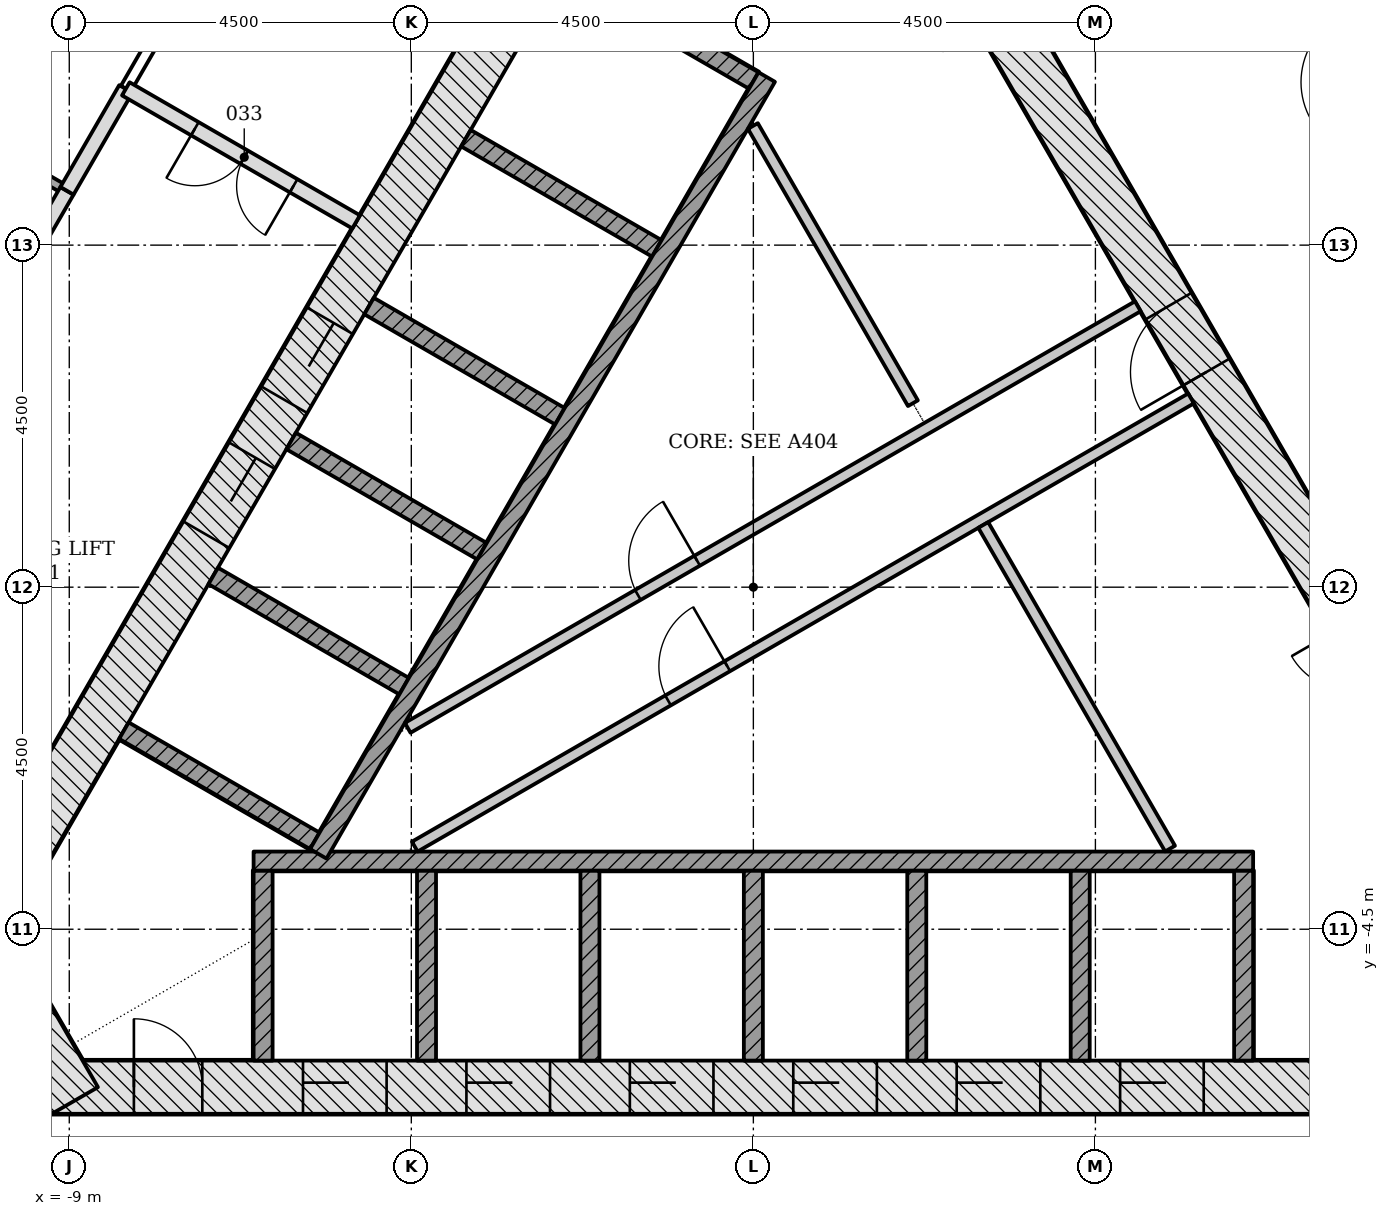
"""IFC4 building model, lengths in metres.
Left out: names, types, materials, properties, quantities, classifications, styles, units other than length and angle.
Written with IfcOpenShell. Run it as: python <this file> out.ifc"""

import sys

from ifc_helpers import new_model, si_unit, direction, frame, frame_2d, origin, place, context, subcontext, project, spatial, rectangle, extrude, element, fill, save


model = new_model("IFC4")
c1 = context("Model", 3, precision=1e-05, world=origin(), true_north=direction((0.0, 1.0)))
c2 = subcontext(c1, "Body", "Model", "MODEL_VIEW")
j1 = project(units=[si_unit("LENGTHUNIT", "METRE"), si_unit("PLANEANGLEUNIT", "RADIAN")], contexts=[c1])
p1 = place(None, origin())
s1 = spatial("IfcSite", under=j1, at=p1, CompositionType="ELEMENT")
p2 = place(p1, origin())
s2 = spatial("IfcBuilding", under=s1, at=p2, CompositionType="ELEMENT")
p3 = place(p2, frame((0.0, 0.0, 6.0)))
s3 = spatial("IfcBuildingStorey", under=s2, at=p3, CompositionType="ELEMENT", Elevation=6.0)
p4 = place(p3, frame((-9.229, -6.578, -0.25), z_axis=(0.0, 0.0, 1.0), x_axis=(1.0, 0.0, 0.0)))
e1 = element("IfcWall", 1, at=p4, inside=s3, PredefinedType="SHEAR", context=c2, shape_type="SweptSolid", body=[
    extrude(rectangle(XDim=18.458, YDim=0.7, at=frame_2d((9.229, 0.0))), origin(), (0.0, 0.0, 1.0), 4.5),
])
p5 = place(p4, frame((3.304, 0.0, 0.25)))
e2 = element("IfcOpeningElement", 2, at=p5, cuts=e1, PredefinedType="OPENING", context=c2, shape_type="SweptSolid", body=[
    extrude(rectangle(XDim=1.1, YDim=2.1, at=frame_2d((0.55, 1.05))), frame((0.0, 0.36, 0.0), z_axis=(0.0, -1.0, 0.0), x_axis=(1.0, 0.0, 0.0)), (0.0, 0.0, 1.0), 0.72),
])
p6 = place(p4, frame((5.454, 0.0, 0.25)))
e3 = element("IfcOpeningElement", 3, at=p6, cuts=e1, PredefinedType="OPENING", context=c2, shape_type="SweptSolid", body=[
    extrude(rectangle(XDim=1.1, YDim=2.1, at=frame_2d((0.55, 1.05))), frame((0.0, 0.36, 0.0), z_axis=(0.0, -1.0, 0.0), x_axis=(1.0, 0.0, 0.0)), (0.0, 0.0, 1.0), 0.72),
])
p7 = place(p4, frame((7.604, 0.0, 0.25)))
e4 = element("IfcOpeningElement", 4, at=p7, cuts=e1, PredefinedType="OPENING", context=c2, shape_type="SweptSolid", body=[
    extrude(rectangle(XDim=1.1, YDim=2.1, at=frame_2d((0.55, 1.05))), frame((0.0, 0.36, 0.0), z_axis=(0.0, -1.0, 0.0), x_axis=(1.0, 0.0, 0.0)), (0.0, 0.0, 1.0), 0.72),
])
p8 = place(p4, frame((9.754, 0.0, 0.25)))
e5 = element("IfcOpeningElement", 5, at=p8, cuts=e1, PredefinedType="OPENING", context=c2, shape_type="SweptSolid", body=[
    extrude(rectangle(XDim=1.1, YDim=2.1, at=frame_2d((0.55, 1.05))), frame((0.0, 0.36, 0.0), z_axis=(0.0, -1.0, 0.0), x_axis=(1.0, 0.0, 0.0)), (0.0, 0.0, 1.0), 0.72),
])
p9 = place(p4, frame((11.904, 0.0, 0.25)))
e6 = element("IfcOpeningElement", 6, at=p9, cuts=e1, PredefinedType="OPENING", context=c2, shape_type="SweptSolid", body=[
    extrude(rectangle(XDim=1.1, YDim=2.1, at=frame_2d((0.55, 1.05))), frame((0.0, 0.36, 0.0), z_axis=(0.0, -1.0, 0.0), x_axis=(1.0, 0.0, 0.0)), (0.0, 0.0, 1.0), 0.72),
])
p10 = place(p4, frame((14.054, 0.0, 0.25)))
e7 = element("IfcOpeningElement", 7, at=p10, cuts=e1, PredefinedType="OPENING", context=c2, shape_type="SweptSolid", body=[
    extrude(rectangle(XDim=1.1, YDim=2.1, at=frame_2d((0.55, 1.05))), frame((0.0, 0.36, 0.0), z_axis=(0.0, -1.0, 0.0), x_axis=(1.0, 0.0, 0.0)), (0.0, 0.0, 1.0), 0.72),
])
p11 = place(p4, frame((1.079, 0.0, 0.25)))
e8 = element("IfcOpeningElement", 8, at=p11, cuts=e1, PredefinedType="OPENING", context=c2, shape_type="SweptSolid", body=[
    extrude(rectangle(XDim=0.9, YDim=2.1, at=frame_2d((0.45, 1.05))), frame((0.0, 0.36, 0.0), z_axis=(0.0, -1.0, 0.0), x_axis=(1.0, 0.0, 0.0)), (0.0, 0.0, 1.0), 0.72),
])
p12 = place(p3, frame((10.311, -4.703, -0.25), z_axis=(0.0, 0.0, 1.0), x_axis=(-0.500001446645, 0.866024568562, 0.0)))
e9 = element("IfcWall", 9, at=p12, inside=s3, PredefinedType="SHEAR", context=c2, shape_type="SweptSolid", body=[
    extrude(rectangle(XDim=18.458, YDim=0.7, at=frame_2d((9.229, 0.0))), origin(), (0.0, 0.0, 1.0), 4.5),
])
p13 = place(p12, frame((8.7, 0.0, 0.25)))
e10 = element("IfcOpeningElement", 10, at=p13, cuts=e9, PredefinedType="OPENING", context=c2, shape_type="SweptSolid", body=[
    extrude(rectangle(XDim=1.0, YDim=2.1, at=frame_2d((0.5, 1.05))), frame((0.0, 0.36, 0.0), z_axis=(0.0, -1.0, 0.0), x_axis=(1.0, 0.0, 0.0)), (0.0, 0.0, 1.0), 0.72),
])
p14 = place(p12, frame((4.002, 0.0, 0.25)))
e11 = element("IfcOpeningElement", 11, at=p14, cuts=e9, PredefinedType="OPENING", context=c2, shape_type="SweptSolid", body=[
    extrude(rectangle(XDim=0.9, YDim=2.1, at=frame_2d((0.45, 1.05))), frame((0.0, 0.36, 0.0), z_axis=(0.0, -1.0, 0.0), x_axis=(1.0, 0.0, 0.0)), (0.0, 0.0, 1.0), 0.72),
])
p15 = place(p12, frame((14.093, 0.0, 0.25)))
e12 = element("IfcOpeningElement", 12, at=p15, cuts=e9, PredefinedType="OPENING", context=c2, shape_type="SweptSolid", body=[
    extrude(rectangle(XDim=0.9, YDim=2.1, at=frame_2d((0.45, 1.05))), frame((0.0, 0.36, 0.0), z_axis=(0.0, -1.0, 0.0), x_axis=(1.0, 0.0, 0.0)), (0.0, 0.0, 1.0), 0.72),
])
p16 = place(p3, frame((-1.083, 11.281, -0.25), z_axis=(0.0, 0.0, 1.0), x_axis=(-0.500001446645, -0.866024568562, 0.0)))
e13 = element("IfcWall", 13, at=p16, inside=s3, PredefinedType="SHEAR", context=c2, shape_type="SweptSolid", body=[
    extrude(rectangle(XDim=18.458, YDim=0.7, at=frame_2d((9.229, 0.0))), origin(), (0.0, 0.0, 1.0), 4.5),
])
p17 = place(p16, frame((8.979, 0.0, 0.25)))
e14 = element("IfcOpeningElement", 14, at=p17, cuts=e13, PredefinedType="OPENING", context=c2, shape_type="SweptSolid", body=[
    extrude(rectangle(XDim=1.2, YDim=2.1, at=frame_2d((0.6, 1.05))), frame((0.0, 0.36, 0.0), z_axis=(0.0, -1.0, 0.0), x_axis=(1.0, 0.0, 0.0)), (0.0, 0.0, 1.0), 0.72),
])
p18 = place(p16, frame((11.029, 0.0, 0.25)))
e15 = element("IfcOpeningElement", 15, at=p18, cuts=e13, PredefinedType="OPENING", context=c2, shape_type="SweptSolid", body=[
    extrude(rectangle(XDim=1.2, YDim=2.1, at=frame_2d((0.6, 1.05))), frame((0.0, 0.36, 0.0), z_axis=(0.0, -1.0, 0.0), x_axis=(1.0, 0.0, 0.0)), (0.0, 0.0, 1.0), 0.72),
])
p19 = place(p3, frame((-10.311, -4.353, -0.25), z_axis=(0.0, 0.0, 1.0), x_axis=(0.500042739161, -0.866000726912, 0.0)))
e16 = element("IfcWall", 16, at=p19, inside=s3, PredefinedType="SHEAR", context=c2, shape_type="SweptSolid", body=[
    extrude(rectangle(XDim=2.771, YDim=0.7, at=frame_2d((1.386, 0.0))), origin(), (0.0, 0.0, 1.0), 4.5),
])
for number, where, z_axis, x_axis in (
    (17, (-6.45, -6.228, -0.25), (0.0, 0.0, 1.0), (0.0, 1.0, 0.0)),
    (18, (-4.3, -6.228, -0.25), (0.0, 0.0, 1.0), (0.0, 1.0, 0.0)),
    (19, (-2.15, -6.228, -0.25), (0.0, 0.0, 1.0), (0.0, 1.0, 0.0)),
    (20, (0.0, -6.228, -0.25), (0.0, 0.0, 1.0), (0.0, 1.0, 0.0)),
    (21, (2.15, -6.228, -0.25), (0.0, 0.0, 1.0), (0.0, 1.0, 0.0)),
    (22, (4.3, -6.228, -0.25), (0.0, 0.0, 1.0), (0.0, 1.0, 0.0)),
    (23, (6.45, -6.228, -0.25), (0.0, 0.0, 1.0), (0.0, 1.0, 0.0)),
):
    element("IfcWall", number, at=place(p3, frame(where, z_axis=z_axis, x_axis=x_axis)), inside=s3, PredefinedType="PARTITIONING", context=c2, shape_type="SweptSolid", body=[
        extrude(rectangle(XDim=2.5, YDim=0.25, at=frame_2d((1.25, 0.0))), origin(), (0.0, 0.0, 1.0), 4.5),
    ])
p20 = place(p3, frame((-6.575, -3.603, 0.0), z_axis=(0.0, 0.0, 1.0), x_axis=(1.0, 0.0, 0.0)))
e24 = element("IfcWall", 24, at=p20, inside=s3, PredefinedType="PARTITIONING", context=c2, shape_type="SweptSolid", body=[
    extrude(rectangle(XDim=13.15, YDim=0.25, at=frame_2d((6.575, 0.0))), origin(), (0.0, 0.0, 1.0), 4.25),
])
p21 = place(p3, frame((-2.506, 8.115, -0.25), z_axis=(0.0, 0.0, 1.0), x_axis=(0.865996321171, -0.50005036918, 0.0)))
e25 = element("IfcWall", 25, at=p21, inside=s3, PredefinedType="PARTITIONING", context=c2, shape_type="SweptSolid", body=[
    extrude(rectangle(XDim=2.9, YDim=0.25, at=frame_2d((1.45, 0.0))), origin(), (0.0, 0.0, 1.0), 4.5),
])
for number, where, z_axis, x_axis in (
    (26, (-3.781, 5.907, -0.25), (0.0, 0.0, 1.0), (0.866, -0.5, 0.0)),
    (27, (-5.056, 3.699, -0.25), (0.0, 0.0, 1.0), (0.866, -0.5, 0.0)),
    (28, (-6.081, 1.923, -0.25), (0.0, 0.0, 1.0), (0.866, -0.5, 0.0)),
    (29, (-7.106, 0.148, -0.25), (0.0, 0.0, 1.0), (0.866, -0.5, 0.0)),
    (30, (-8.281, -1.887, -0.25), (0.0, 0.0, 1.0), (0.866, -0.5, 0.0)),
):
    element("IfcWall", number, at=place(p3, frame(where, z_axis=z_axis, x_axis=x_axis)), inside=s3, PredefinedType="PARTITIONING", context=c2, shape_type="SweptSolid", body=[
        extrude(rectangle(XDim=2.9, YDim=0.25, at=frame_2d((1.45, 0.0))), origin(), (0.0, 0.0, 1.0), 4.5),
    ])
p22 = place(p3, frame((0.176, 6.711, 0.0), z_axis=(0.0, 0.0, 1.0), x_axis=(-0.500004227369, -0.866022963098, 0.0)))
e31 = element("IfcWall", 31, at=p22, inside=s3, PredefinedType="PARTITIONING", context=c2, shape_type="SweptSolid", body=[
    extrude(rectangle(XDim=11.8, YDim=0.25, at=frame_2d((5.9, 0.0))), origin(), (0.0, 0.0, 1.0), 4.25),
])
p23 = place(p3, frame((-4.548, -1.851, 0.0), z_axis=(0.0, 0.0, 1.0), x_axis=(0.866023939251, 0.500002536638, 0.0)))
e32 = element("IfcWall", 32, at=p23, inside=s3, PredefinedType="PARTITIONING", context=c2, shape_type="SweptSolid", body=[
    extrude(rectangle(XDim=11.092, YDim=0.15, at=frame_2d((5.546, 0.0))), origin(), (0.0, 0.0, 1.0), 4.25),
])
p24 = place(p23, frame((3.497, 0.0, 0.0)))
e33 = element("IfcOpeningElement", 33, at=p24, cuts=e32, PredefinedType="OPENING", context=c2, shape_type="SweptSolid", body=[
    extrude(rectangle(XDim=0.9, YDim=2.1, at=frame_2d((0.45, 1.05))), frame((0.0, 0.085, 0.0), z_axis=(0.0, -1.0, 0.0), x_axis=(1.0, 0.0, 0.0)), (0.0, 0.0, 1.0), 0.17),
])
p25 = place(p3, frame((2.099, 2.42, 0.0), z_axis=(0.0, 0.0, 1.0), x_axis=(-0.499998449073, 0.866026299211, 0.0)))
e34 = element("IfcWall", 34, at=p25, inside=s3, PredefinedType="PARTITIONING", context=c2, shape_type="SweptSolid", body=[
    extrude(rectangle(XDim=4.211, YDim=0.15, at=frame_2d((2.106, 0.0))), origin(), (0.0, 0.0, 1.0), 4.25),
])
p26 = place(p3, frame((-4.454, -3.413, 0.0), z_axis=(0.0, 0.0, 1.0), x_axis=(0.86603043987, 0.499991277142, 0.0)))
e35 = element("IfcWall", 35, at=p26, inside=s3, PredefinedType="PARTITIONING", context=c2, shape_type="SweptSolid", body=[
    extrude(rectangle(XDim=11.792, YDim=0.15, at=frame_2d((5.896, 0.0))), origin(), (0.0, 0.0, 1.0), 4.25),
])
p27 = place(p26, frame((3.847, 0.0, 0.0)))
e36 = element("IfcOpeningElement", 36, at=p27, cuts=e35, PredefinedType="OPENING", context=c2, shape_type="SweptSolid", body=[
    extrude(rectangle(XDim=0.9, YDim=2.1, at=frame_2d((0.45, 1.05))), frame((0.0, 0.085, 0.0), z_axis=(0.0, -1.0, 0.0), x_axis=(1.0, 0.0, 0.0)), (0.0, 0.0, 1.0), 0.17),
])
p28 = place(p3, frame((5.482, -3.439, 0.0), z_axis=(0.0, 0.0, 1.0), x_axis=(-0.500006183238, 0.866021833861, 0.0)))
e37 = element("IfcWall", 37, at=p28, inside=s3, PredefinedType="PARTITIONING", context=c2, shape_type="SweptSolid", body=[
    extrude(rectangle(XDim=4.916, YDim=0.15, at=frame_2d((2.458, 0.0))), origin(), (0.0, 0.0, 1.0), 4.25),
])
p29 = place(p3, frame((-9.031, 5.213, 0.0), z_axis=(0.0, 0.0, 1.0), x_axis=(-0.500044734646, -0.865999574684, 0.0)))
e38 = element("IfcWall", 38, at=p29, inside=s3, PredefinedType="PARTITIONING", context=c2, shape_type="SweptSolid", body=[
    extrude(rectangle(XDim=4.35, YDim=0.2, at=frame_2d((2.175, 0.0))), origin(), (0.0, 0.0, 1.0), 3.638),
])
p30 = place(p3, frame((-8.256, 6.555, 0.0), z_axis=(0.0, 0.0, 1.0), x_axis=(-0.500177701192, -0.865922783642, 0.0)))
e39 = element("IfcWall", 39, at=p30, inside=s3, PredefinedType="PARTITIONING", context=c2, shape_type="SweptSolid", body=[
    extrude(rectangle(XDim=1.547, YDim=0.2, at=frame_2d((0.774, 0.0))), origin(), (0.0, 0.0, 1.0), 3.638),
])
p31 = place(p3, frame((-5.226, 4.806, 0.0), z_axis=(0.0, 0.0, 1.0), x_axis=(-0.865949687125, 0.500131122175, 0.0)))
e40 = element("IfcWall", 40, at=p31, inside=s3, PredefinedType="PARTITIONING", context=c2, shape_type="SweptSolid", body=[
    extrude(rectangle(XDim=3.499, YDim=0.2, at=frame_2d((1.75, 0.0))), origin(), (0.0, 0.0, 1.0), 4.25),
])
p32 = place(p31, frame((0.95, 0.0, 0.0)))
e41 = element("IfcOpeningElement", 41, at=p32, cuts=e40, PredefinedType="OPENING", context=c2, shape_type="SweptSolid", body=[
    extrude(rectangle(XDim=1.5, YDim=2.1, at=frame_2d((0.75, 1.05))), frame((0.0, 0.11, 0.0), z_axis=(0.0, -1.0, 0.0), x_axis=(1.0, 0.0, 0.0)), (0.0, 0.0, 1.0), 0.22),
])
p33 = place(p3, frame((9.03, 5.215, 0.0), z_axis=(0.0, 0.0, 1.0), x_axis=(-0.500070818246, 0.86598451299, 0.0)))
e42 = element("IfcWall", 42, at=p33, inside=s3, PredefinedType="PARTITIONING", context=c2, shape_type="SweptSolid", body=[
    extrude(rectangle(XDim=4.347, YDim=0.15, at=frame_2d((2.174, 0.0))), origin(), (0.0, 0.0, 1.0), 3.638),
])
p34 = place(p33, frame((1.65, 0.0, 0.0)))
e43 = element("IfcOpeningElement", 43, at=p34, cuts=e42, PredefinedType="OPENING", context=c2, shape_type="SweptSolid", body=[
    extrude(rectangle(XDim=1.0, YDim=2.1, at=frame_2d((0.5, 1.05))), frame((0.0, 0.085, 0.0), z_axis=(0.0, -1.0, 0.0), x_axis=(1.0, 0.0, 0.0)), (0.0, 0.0, 1.0), 0.17),
])
p35 = place(p3, frame((-9.032, 5.215, 0.0), z_axis=(0.0, 0.0, 1.0), x_axis=(-0.866130767322, 0.499817460578, 0.0)))
e44 = element("IfcWall", 44, at=p35, inside=s3, PredefinedType="PARTITIONING", context=c2, shape_type="SweptSolid", body=[
    extrude(rectangle(XDim=4.597, YDim=0.12, at=frame_2d((2.299, 0.0))), origin(), (0.0, 0.0, 1.0), 3.638),
])
p36 = place(p3, frame((-8.256, 6.558, 0.0), z_axis=(0.0, 0.0, 1.0), x_axis=(0.500081734942, 0.86597820895, 0.0)))
e45 = element("IfcWall", 45, at=p36, inside=s3, PredefinedType="PARTITIONING", context=c2, shape_type="SweptSolid", body=[
    extrude(rectangle(XDim=2.804, YDim=0.15, at=frame_2d((1.402, 0.0))), origin(), (0.0, 0.0, 1.0), 3.638),
])
p37 = place(p36, frame((0.95, 0.0, 0.0)))
e46 = element("IfcOpeningElement", 46, at=p37, cuts=e45, PredefinedType="OPENING", context=c2, shape_type="SweptSolid", body=[
    extrude(rectangle(XDim=1.0, YDim=2.1, at=frame_2d((0.5, 1.05))), frame((0.0, 0.085, 0.0), z_axis=(0.0, -1.0, 0.0), x_axis=(1.0, 0.0, 0.0)), (0.0, 0.0, 1.0), 0.17),
])
p38 = place(p5, origin())
e47 = element("IfcDoor", 47, at=p38, inside=s3, OperationType="DOUBLE_DOOR_SLIDING", PredefinedType="DOOR", context=c2, shape_type="SweptSolid", body=[
    extrude(rectangle(XDim=1.1, YDim=2.1, at=frame_2d((0.55, 1.05))), frame((0.0, 0.025, 0.0), z_axis=(0.0, -1.0, 0.0), x_axis=(1.0, 0.0, 0.0)), (0.0, 0.0, 1.0), 0.05),
])
fill(e2, e47)
p39 = place(p6, origin())
e48 = element("IfcDoor", 48, at=p39, inside=s3, OperationType="DOUBLE_DOOR_SLIDING", PredefinedType="DOOR", context=c2, shape_type="SweptSolid", body=[
    extrude(rectangle(XDim=1.1, YDim=2.1, at=frame_2d((0.55, 1.05))), frame((0.0, 0.025, 0.0), z_axis=(0.0, -1.0, 0.0), x_axis=(1.0, 0.0, 0.0)), (0.0, 0.0, 1.0), 0.05),
])
fill(e3, e48)
p40 = place(p7, origin())
e49 = element("IfcDoor", 49, at=p40, inside=s3, OperationType="DOUBLE_DOOR_SLIDING", PredefinedType="DOOR", context=c2, shape_type="SweptSolid", body=[
    extrude(rectangle(XDim=1.1, YDim=2.1, at=frame_2d((0.55, 1.05))), frame((0.0, 0.025, 0.0), z_axis=(0.0, -1.0, 0.0), x_axis=(1.0, 0.0, 0.0)), (0.0, 0.0, 1.0), 0.05),
])
fill(e4, e49)
p41 = place(p8, origin())
e50 = element("IfcDoor", 50, at=p41, inside=s3, OperationType="DOUBLE_DOOR_SLIDING", PredefinedType="DOOR", context=c2, shape_type="SweptSolid", body=[
    extrude(rectangle(XDim=1.1, YDim=2.1, at=frame_2d((0.55, 1.05))), frame((0.0, 0.025, 0.0), z_axis=(0.0, -1.0, 0.0), x_axis=(1.0, 0.0, 0.0)), (0.0, 0.0, 1.0), 0.05),
])
fill(e5, e50)
p42 = place(p9, origin())
e51 = element("IfcDoor", 51, at=p42, inside=s3, OperationType="DOUBLE_DOOR_SLIDING", PredefinedType="DOOR", context=c2, shape_type="SweptSolid", body=[
    extrude(rectangle(XDim=1.1, YDim=2.1, at=frame_2d((0.55, 1.05))), frame((0.0, 0.025, 0.0), z_axis=(0.0, -1.0, 0.0), x_axis=(1.0, 0.0, 0.0)), (0.0, 0.0, 1.0), 0.05),
])
fill(e6, e51)
p43 = place(p10, origin())
e52 = element("IfcDoor", 52, at=p43, inside=s3, OperationType="DOUBLE_DOOR_SLIDING", PredefinedType="DOOR", context=c2, shape_type="SweptSolid", body=[
    extrude(rectangle(XDim=1.1, YDim=2.1, at=frame_2d((0.55, 1.05))), frame((0.0, 0.025, 0.0), z_axis=(0.0, -1.0, 0.0), x_axis=(1.0, 0.0, 0.0)), (0.0, 0.0, 1.0), 0.05),
])
fill(e7, e52)
p44 = place(p17, origin())
e53 = element("IfcDoor", 53, at=p44, inside=s3, OperationType="DOUBLE_DOOR_SLIDING", PredefinedType="DOOR", context=c2, shape_type="SweptSolid", body=[
    extrude(rectangle(XDim=1.2, YDim=2.1, at=frame_2d((0.6, 1.05))), frame((0.0, 0.025, 0.0), z_axis=(0.0, -1.0, 0.0), x_axis=(1.0, 0.0, 0.0)), (0.0, 0.0, 1.0), 0.05),
])
fill(e14, e53)
p45 = place(p18, origin())
e54 = element("IfcDoor", 54, at=p45, inside=s3, OperationType="DOUBLE_DOOR_SLIDING", PredefinedType="DOOR", context=c2, shape_type="SweptSolid", body=[
    extrude(rectangle(XDim=1.2, YDim=2.1, at=frame_2d((0.6, 1.05))), frame((0.0, 0.025, 0.0), z_axis=(0.0, -1.0, 0.0), x_axis=(1.0, 0.0, 0.0)), (0.0, 0.0, 1.0), 0.05),
])
fill(e15, e54)
p46 = place(p13, origin())
e55 = element("IfcDoor", 55, at=p46, inside=s3, OperationType="SINGLE_SWING_LEFT", PredefinedType="DOOR", context=c2, shape_type="SweptSolid", body=[
    extrude(rectangle(XDim=1.0, YDim=2.1, at=frame_2d((0.5, 1.05))), frame((0.0, 0.075, 0.0), z_axis=(0.0, -1.0, 0.0), x_axis=(1.0, 0.0, 0.0)), (0.0, 0.0, 1.0), 0.15),
])
fill(e10, e55)
p47 = place(p27, origin())
e56 = element("IfcDoor", 56, at=p47, inside=s3, OperationType="SINGLE_SWING_RIGHT", PredefinedType="DOOR", context=c2, shape_type="SweptSolid", body=[
    extrude(rectangle(XDim=0.9, YDim=2.1, at=frame_2d((0.45, 1.05))), frame((0.0, 0.025, 0.0), z_axis=(0.0, -1.0, 0.0), x_axis=(1.0, 0.0, 0.0)), (0.0, 0.0, 1.0), 0.05),
])
fill(e36, e56)
p48 = place(p11, origin())
e57 = element("IfcDoor", 57, at=p48, inside=s3, OperationType="SINGLE_SWING_LEFT", PredefinedType="DOOR", context=c2, shape_type="SweptSolid", body=[
    extrude(rectangle(XDim=0.9, YDim=2.1, at=frame_2d((0.45, 1.05))), frame((0.0, 0.075, 0.0), z_axis=(0.0, -1.0, 0.0), x_axis=(1.0, 0.0, 0.0)), (0.0, 0.0, 1.0), 0.15),
])
fill(e8, e57)
p49 = place(p24, origin())
e58 = element("IfcDoor", 58, at=p49, inside=s3, OperationType="SINGLE_SWING_RIGHT", PredefinedType="DOOR", context=c2, shape_type="SweptSolid", body=[
    extrude(rectangle(XDim=0.9, YDim=2.1, at=frame_2d((0.45, 1.05))), frame((0.0, 0.025, 0.0), z_axis=(0.0, -1.0, 0.0), x_axis=(1.0, 0.0, 0.0)), (0.0, 0.0, 1.0), 0.05),
])
fill(e33, e58)
p50 = place(p32, origin())
e59 = element("IfcDoor", 59, at=p50, inside=s3, OperationType="DOUBLE_DOOR_SINGLE_SWING", PredefinedType="DOOR", context=c2, shape_type="SweptSolid", body=[
    extrude(rectangle(XDim=1.5, YDim=2.1, at=frame_2d((0.75, 1.05))), frame((0.0, 0.025, 0.0), z_axis=(0.0, -1.0, 0.0), x_axis=(1.0, 0.0, 0.0)), (0.0, 0.0, 1.0), 0.05),
])
fill(e41, e59)
save(model, sys.argv[1])
